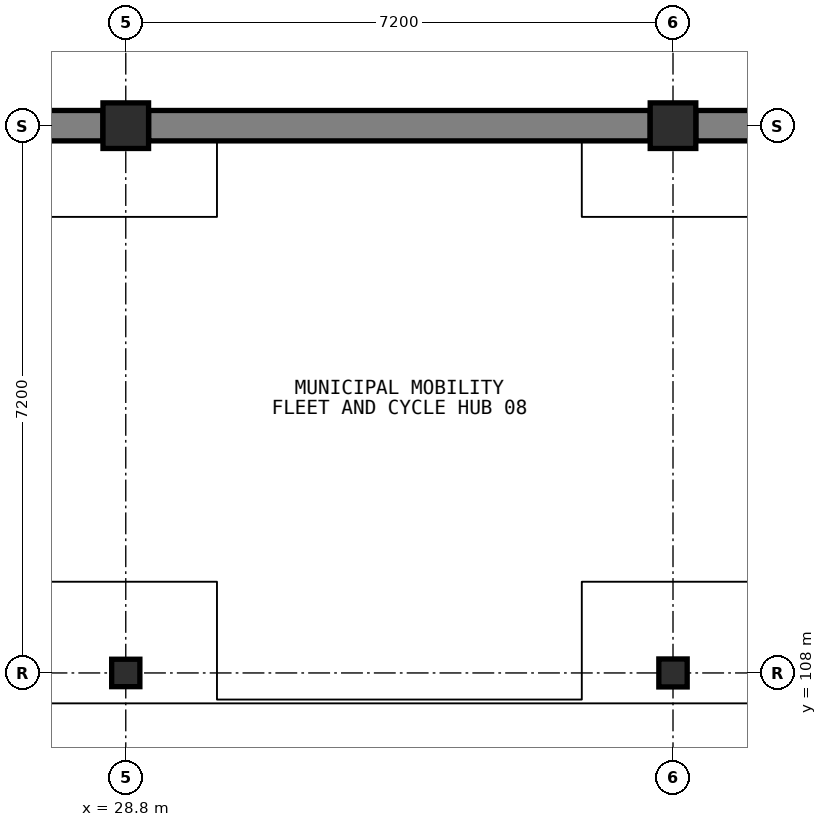
"""IFC4 building model, lengths in metres.
Left out: names, types, materials, properties, quantities, classifications, styles, units other than length and angle.
Written with IfcOpenShell. Run it as: python <this file> out.ifc"""

import sys

from ifc_helpers import new_model, si_unit, direction, frame, frame_2d, origin, origin_2d, place, context, subcontext, project, spatial, rectangle, i_section, extrude, element, save


model = new_model("IFC4")
c1 = context("Model", 3, precision=1e-05, world=origin(), true_north=direction((0.0, 1.0)))
c2 = subcontext(c1, "Body", "Model", "MODEL_VIEW")
j1 = project(units=[si_unit("LENGTHUNIT", "METRE"), si_unit("PLANEANGLEUNIT", "RADIAN")], contexts=[c1])
p1 = place(None, origin())
s1 = spatial("IfcSite", under=j1, at=p1, CompositionType="ELEMENT")
p2 = place(p1, origin())
s2 = spatial("IfcBuilding", under=s1, at=p2, CompositionType="ELEMENT")
p3 = place(p2, frame((0.0, 0.0, -4.2)))
s3 = spatial("IfcBuildingStorey", under=s2, at=p3, CompositionType="ELEMENT", Elevation=-4.2)
p4 = place(p3, frame((21.9, 115.2, 0.0), z_axis=(0.0, 0.0, 1.0), x_axis=(1.0, 0.0, 0.0)))
e1 = element("IfcWall", 1, at=p4, inside=s3, PredefinedType="USERDEFINED", context=c2, shape_type="SweptSolid", body=[
    extrude(rectangle(XDim=6.6, YDim=0.4, at=frame_2d((3.3, 0.0))), origin(), (0.0, 0.0, 1.0), 3.98),
])
for number, where, z_axis, x_axis in (
    (2, (29.1, 115.2, 0.0), (0.0, 0.0, 1.0), (1.0, 0.0, 0.0)),
    (3, (36.3, 115.2, 0.0), (0.0, 0.0, 1.0), (1.0, 0.0, 0.0)),
):
    element("IfcWall", number, at=place(p3, frame(where, z_axis=z_axis, x_axis=x_axis)), inside=s3, PredefinedType="USERDEFINED", context=c2, shape_type="SweptSolid", body=[
        extrude(rectangle(XDim=6.6, YDim=0.4, at=frame_2d((3.3, 0.0))), origin(), (0.0, 0.0, 1.0), 3.98),
    ])
p5 = place(p3, frame((28.8, 108.0, 0.0), z_axis=(0.0, 0.0, 1.0), x_axis=(1.0, 0.0, 0.0)))
e4 = element("IfcColumn", 4, at=p5, inside=s3, PredefinedType="COLUMN", context=c2, shape_type="SweptSolid", body=[
    extrude(i_section(OverallWidth=0.371, OverallDepth=0.361, WebThickness=0.012, FlangeThickness=0.02, FilletRadius=0.015, at=origin_2d()), origin(), (0.0, 0.0, 1.0), 4.2),
])
p6 = place(p3, frame((28.8, 115.2, 0.0), z_axis=(0.0, 0.0, 1.0), x_axis=(1.0, 0.0, 0.0)))
e5 = element("IfcColumn", 5, at=p6, inside=s3, PredefinedType="COLUMN", context=c2, shape_type="SweptSolid", body=[
    extrude(rectangle(XDim=0.6, YDim=0.6, at=origin_2d()), origin(), (0.0, 0.0, 1.0), 4.2),
])
p7 = place(p3, frame((36.0, 108.0, 0.0), z_axis=(0.0, 0.0, 1.0), x_axis=(1.0, 0.0, 0.0)))
e6 = element("IfcColumn", 6, at=p7, inside=s3, PredefinedType="COLUMN", context=c2, shape_type="SweptSolid", body=[
    extrude(i_section(OverallWidth=0.373, OverallDepth=0.368, WebThickness=0.015, FlangeThickness=0.024, FilletRadius=0.015, at=origin_2d()), origin(), (0.0, 0.0, 1.0), 4.2),
])
p8 = place(p3, frame((36.0, 115.2, 0.0), z_axis=(0.0, 0.0, 1.0), x_axis=(1.0, 0.0, 0.0)))
e7 = element("IfcColumn", 7, at=p8, inside=s3, PredefinedType="COLUMN", context=c2, shape_type="SweptSolid", body=[
    extrude(rectangle(XDim=0.6, YDim=0.6, at=origin_2d()), origin(), (0.0, 0.0, 1.0), 4.2),
])
save(model, sys.argv[1])
